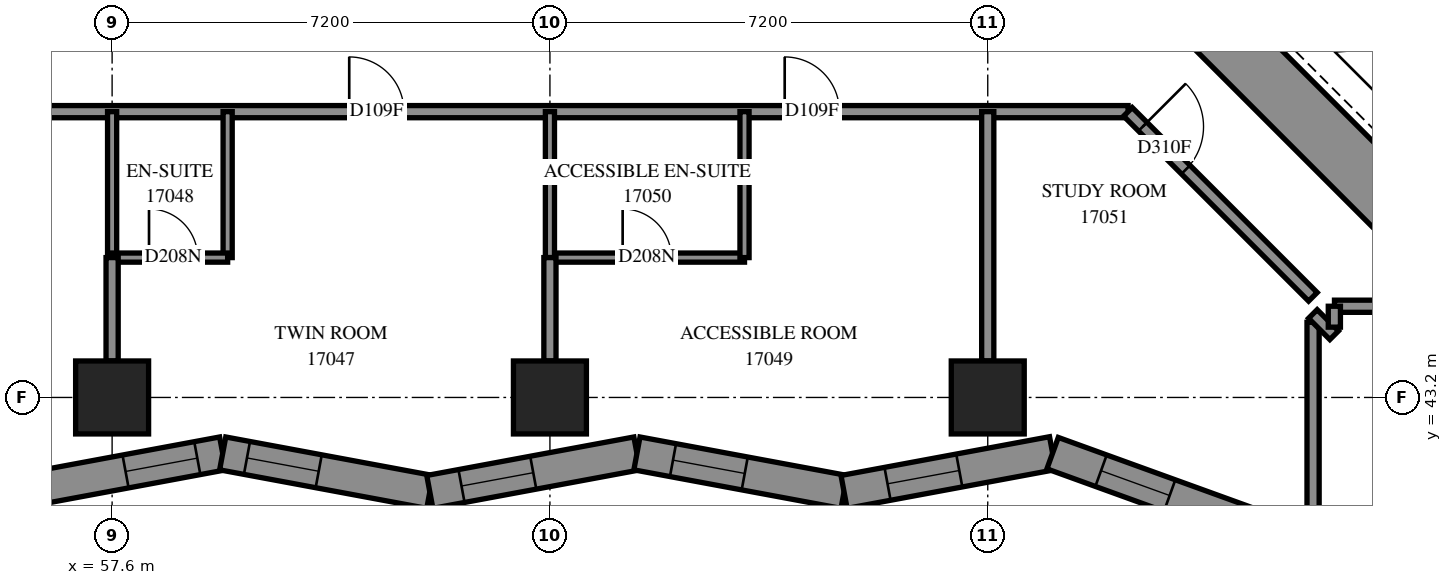
"""IFC4 building model, lengths in metres.
Left out: names, types, materials, properties, quantities, classifications, styles, units other than length and angle.
Written with IfcOpenShell. Run it as: python <this file> out.ifc"""

import sys

from ifc_helpers import new_model, si_unit, direction, frame, frame_2d, origin, origin_2d, place, context, subcontext, project, spatial, polyline, rectangle, outline, extrude, element, fill, save


model = new_model("IFC4")
c1 = context("Model", 3, precision=1e-05, world=origin(), true_north=direction((0.0, 1.0)))
c2 = subcontext(c1, "Body", "Model", "MODEL_VIEW")
j1 = project(units=[si_unit("LENGTHUNIT", "METRE"), si_unit("PLANEANGLEUNIT", "RADIAN")], contexts=[c1])
p1 = place(None, origin())
s1 = spatial("IfcSite", under=j1, at=p1, CompositionType="ELEMENT")
p2 = place(p1, origin())
s2 = spatial("IfcBuilding", under=s1, at=p2, CompositionType="ELEMENT")
p3 = place(p2, frame((0.0, 0.0, 64.4)))
s3 = spatial("IfcBuildingStorey", under=s2, at=p3, CompositionType="ELEMENT", Elevation=64.4)
for number, where, z_axis, x_axis in (
    (1, (57.6, 43.2, 0.0), (0.0, 0.0, 1.0), (1.0, 0.0, 0.0)),
    (2, (64.8, 43.2, 0.0), (0.0, 0.0, 1.0), (1.0, 0.0, 0.0)),
    (3, (72.0, 43.2, 0.0), (0.0, 0.0, 1.0), (1.0, 0.0, 0.0)),
):
    element("IfcColumn", number, at=place(p3, frame(where, z_axis=z_axis, x_axis=x_axis)), inside=s3, PredefinedType="COLUMN", context=c2, shape_type="SweptSolid", body=[
        extrude(rectangle(XDim=1.2, YDim=1.2, at=origin_2d()), origin(), (0.0, 0.0, 1.0), 3.1),
    ])
p4 = place(p3, frame((75.594, 49.443, -0.3), z_axis=(0.0, 0.0, 1.0), x_axis=(0.7071037324, -0.70710983, 0.0)))
e4 = element("IfcWall", 4, at=p4, inside=s3, PredefinedType="SHEAR", context=c2, shape_type="SweptSolid", body=[
    extrude(rectangle(XDim=16.4, YDim=1.0, at=frame_2d((8.2, 0.0))), origin(), (0.0, 0.0, 1.0), 2.7),
])
p5 = place(p3, frame((56.012, 41.647, 0.0), z_axis=(0.0, 0.0, 1.0), x_axis=(0.9831660022, 0.1827145649, 0.0)))
e5 = element("IfcWall", 5, at=p5, inside=s3, PredefinedType="SOLIDWALL", context=c2, shape_type="SweptSolid", body=[
    extrude(outline(polyline([(-0.051, -0.275), (3.413, -0.275), (3.516, 0.275), (0.051, 0.275), (-0.051, -0.275)])), origin(), (0.0, 0.0, 1.0), 3.1),
])
p6 = place(p5, frame((1.84, 0.0, 0.5)))
e6 = element("IfcOpeningElement", 6, at=p6, cuts=e5, PredefinedType="OPENING", context=c2, shape_type="SweptSolid", body=[
    extrude(rectangle(XDim=1.2, YDim=2.45, at=frame_2d((0.6, 1.225))), frame((0.0, 0.285, 0.0), z_axis=(0.0, -1.0, 0.0), x_axis=(1.0, 0.0, 0.0)), (0.0, 0.0, 1.0), 0.57),
])
p7 = place(p3, frame((59.419, 42.28, 0.0), z_axis=(0.0, 0.0, 1.0), x_axis=(0.9831669658, -0.1827093798, 0.0)))
e7 = element("IfcWall", 7, at=p7, inside=s3, PredefinedType="SOLIDWALL", context=c2, shape_type="SweptSolid", body=[
    extrude(outline(polyline([(0.051, -0.275), (3.516, -0.275), (3.413, 0.275), (-0.051, 0.275), (0.051, -0.275)])), origin(), (0.0, 0.0, 1.0), 3.1),
])
p8 = place(p7, frame((0.406, 0.0, 0.5)))
e8 = element("IfcOpeningElement", 8, at=p8, cuts=e7, PredefinedType="OPENING", context=c2, shape_type="SweptSolid", body=[
    extrude(rectangle(XDim=1.2, YDim=2.45, at=frame_2d((0.6, 1.225))), frame((0.0, 0.285, 0.0), z_axis=(0.0, -1.0, 0.0), x_axis=(1.0, 0.0, 0.0)), (0.0, 0.0, 1.0), 0.57),
])
p9 = place(p3, frame((62.825, 41.647, 0.0), z_axis=(0.0, 0.0, 1.0), x_axis=(0.9831669658, 0.1827093798, 0.0)))
e9 = element("IfcWall", 9, at=p9, inside=s3, PredefinedType="SOLIDWALL", context=c2, shape_type="SweptSolid", body=[
    extrude(outline(polyline([(-0.051, -0.275), (3.413, -0.275), (3.516, 0.275), (0.051, 0.275), (-0.051, -0.275)])), origin(), (0.0, 0.0, 1.0), 3.1),
])
p10 = place(p9, frame((0.53, 0.0, 0.5)))
e10 = element("IfcOpeningElement", 10, at=p10, cuts=e9, PredefinedType="OPENING", context=c2, shape_type="SweptSolid", body=[
    extrude(rectangle(XDim=1.2, YDim=2.45, at=frame_2d((0.6, 1.225))), frame((0.0, 0.285, 0.0), z_axis=(0.0, -1.0, 0.0), x_axis=(1.0, 0.0, 0.0)), (0.0, 0.0, 1.0), 0.57),
])
p11 = place(p3, frame((66.231, 42.28, 0.0), z_axis=(0.0, 0.0, 1.0), x_axis=(0.9831669658, -0.1827093798, 0.0)))
e11 = element("IfcWall", 11, at=p11, inside=s3, PredefinedType="SOLIDWALL", context=c2, shape_type="SweptSolid", body=[
    extrude(outline(polyline([(0.051, -0.275), (3.516, -0.275), (3.413, 0.275), (-0.051, 0.275), (0.051, -0.275)])), origin(), (0.0, 0.0, 1.0), 3.1),
])
p12 = place(p11, frame((0.603, 0.0, 0.5)))
e12 = element("IfcOpeningElement", 12, at=p12, cuts=e11, PredefinedType="OPENING", context=c2, shape_type="SweptSolid", body=[
    extrude(rectangle(XDim=1.2, YDim=2.45, at=frame_2d((0.6, 1.225))), frame((0.0, 0.285, 0.0), z_axis=(0.0, -1.0, 0.0), x_axis=(1.0, 0.0, 0.0)), (0.0, 0.0, 1.0), 0.57),
])
p13 = place(p3, frame((69.637, 41.647, 0.0), z_axis=(0.0, 0.0, 1.0), x_axis=(0.9831675545, 0.1827062117, 0.0)))
e13 = element("IfcWall", 13, at=p13, inside=s3, PredefinedType="SOLIDWALL", context=c2, shape_type="SweptSolid", body=[
    extrude(outline(polyline([(-0.051, -0.275), (3.413, -0.275), (3.563, 0.275), (0.051, 0.275), (-0.051, -0.275)])), origin(), (0.0, 0.0, 1.0), 3.1),
])
p14 = place(p13, frame((0.727, 0.0, 0.5)))
e14 = element("IfcOpeningElement", 14, at=p14, cuts=e13, PredefinedType="OPENING", context=c2, shape_type="SweptSolid", body=[
    extrude(rectangle(XDim=1.2, YDim=2.45, at=frame_2d((0.6, 1.225))), frame((0.0, 0.285, 0.0), z_axis=(0.0, -1.0, 0.0), x_axis=(1.0, 0.0, 0.0)), (0.0, 0.0, 1.0), 0.57),
])
p15 = place(p3, frame((73.067, 42.284, 0.0), z_axis=(0.0, 0.0, 1.0), x_axis=(0.940296151, -0.3403573833, 0.0)))
e15 = element("IfcWall", 15, at=p15, inside=s3, PredefinedType="SOLIDWALL", context=c2, shape_type="SweptSolid", body=[
    extrude(outline(polyline([(0.075, -0.275), (3.697, -0.275), (3.733, 0.275), (-0.075, 0.275), (0.075, -0.275)])), origin(), (0.0, 0.0, 1.0), 3.1),
])
p16 = place(p15, frame((0.847, 0.0, 0.5)))
e16 = element("IfcOpeningElement", 16, at=p16, cuts=e15, PredefinedType="OPENING", context=c2, shape_type="SweptSolid", body=[
    extrude(rectangle(XDim=1.2, YDim=2.45, at=frame_2d((0.6, 1.225))), frame((0.0, 0.285, 0.0), z_axis=(0.0, -1.0, 0.0), x_axis=(1.0, 0.0, 0.0)), (0.0, 0.0, 1.0), 0.57),
])
p17 = place(p3, frame((55.1, 47.9, 0.0), z_axis=(0.0, 0.0, 1.0), x_axis=(1.0, 0.0, 0.0)))
e17 = element("IfcWall", 17, at=p17, inside=s3, PredefinedType="PARTITIONING", context=c2, shape_type="SweptSolid", body=[
    extrude(rectangle(XDim=19.208, YDim=0.2, at=frame_2d((9.604, 0.0))), origin(), (0.0, 0.0, 1.0), 3.1),
])
p18 = place(p17, frame((6.399, 0.0, 0.0)))
e18 = element("IfcOpeningElement", 18, at=p18, cuts=e17, PredefinedType="OPENING", context=c2, shape_type="SweptSolid", body=[
    extrude(rectangle(XDim=0.9, YDim=2.1, at=frame_2d((0.45, 1.05))), frame((0.0, 0.11, 0.0), z_axis=(0.0, -1.0, 0.0), x_axis=(1.0, 0.0, 0.0)), (0.0, 0.0, 1.0), 0.22),
])
p19 = place(p17, frame((13.561, 0.0, 0.0)))
e19 = element("IfcOpeningElement", 19, at=p19, cuts=e17, PredefinedType="OPENING", context=c2, shape_type="SweptSolid", body=[
    extrude(rectangle(XDim=0.9, YDim=2.1, at=frame_2d((0.45, 1.05))), frame((0.0, 0.11, 0.0), z_axis=(0.0, -1.0, 0.0), x_axis=(1.0, 0.0, 0.0)), (0.0, 0.0, 1.0), 0.22),
])
p20 = place(p3, frame((74.305, 47.897, 0.0), z_axis=(0.0, 0.0, 1.0), x_axis=(0.7071067812, -0.7071067812, 0.0)))
e20 = element("IfcWall", 20, at=p20, inside=s3, PredefinedType="PARTITIONING", context=c2, shape_type="SweptSolid", body=[
    extrude(rectangle(XDim=4.302, YDim=0.2, at=frame_2d((2.151, 0.0))), origin(), (0.0, 0.0, 1.0), 3.1),
])
p21 = place(p20, frame((0.345, 0.0, 0.0)))
e21 = element("IfcOpeningElement", 21, at=p21, cuts=e20, PredefinedType="OPENING", context=c2, shape_type="SweptSolid", body=[
    extrude(rectangle(XDim=1.0, YDim=2.1, at=frame_2d((0.5, 1.05))), frame((0.0, 0.11, 0.0), z_axis=(0.0, -1.0, 0.0), x_axis=(1.0, 0.0, 0.0)), (0.0, 0.0, 1.0), 0.22),
])
p22 = place(p3, frame((72.0, 43.8, 0.0), z_axis=(0.0, 0.0, 1.0), x_axis=(0.0, 1.0, 0.0)))
e22 = element("IfcWall", 22, at=p22, inside=s3, PredefinedType="PARTITIONING", context=c2, shape_type="SweptSolid", body=[
    extrude(rectangle(XDim=4.1, YDim=0.2, at=frame_2d((2.05, 0.0))), origin(), (0.0, 0.0, 1.0), 3.1),
])
p23 = place(p3, frame((77.35, 40.92, 0.0), z_axis=(0.0, 0.0, 1.0), x_axis=(0.0, 1.0, 0.0)))
e23 = element("IfcWall", 23, at=p23, inside=s3, PredefinedType="PARTITIONING", context=c2, shape_type="SweptSolid", body=[
    extrude(rectangle(XDim=3.516, YDim=0.2, at=frame_2d((1.758, 0.0))), origin(), (0.0, 0.0, 1.0), 3.1),
])
p24 = place(p3, frame((64.8, 45.5, 0.0), z_axis=(0.0, 0.0, 1.0), x_axis=(1.0, 0.0, 0.0)))
e24 = element("IfcWall", 24, at=p24, inside=s3, PredefinedType="PARTITIONING", context=c2, shape_type="SweptSolid", body=[
    extrude(rectangle(XDim=3.2, YDim=0.15, at=frame_2d((1.6, 0.0))), origin(), (0.0, 0.0, 1.0), 3.1),
])
p25 = place(p24, frame((1.196, 0.0, 0.0)))
e25 = element("IfcOpeningElement", 25, at=p25, cuts=e24, PredefinedType="OPENING", context=c2, shape_type="SweptSolid", body=[
    extrude(rectangle(XDim=0.8, YDim=2.1, at=frame_2d((0.4, 1.05))), frame((0.0, 0.085, 0.0), z_axis=(0.0, -1.0, 0.0), x_axis=(1.0, 0.0, 0.0)), (0.0, 0.0, 1.0), 0.17),
])
for number, where, z_axis, x_axis in (
    (26, (59.5, 45.5, 0.0), (0.0, 0.0, 1.0), (0.0, 1.0, 0.0)),
    (27, (57.6, 45.5, 0.0), (0.0, 0.0, 1.0), (0.0, 1.0, 0.0)),
    (28, (68.0, 45.5, 0.0), (0.0, 0.0, 1.0), (0.0, 1.0, 0.0)),
    (29, (64.8, 45.5, 0.0), (0.0, 0.0, 1.0), (0.0, 1.0, 0.0)),
):
    element("IfcWall", number, at=place(p3, frame(where, z_axis=z_axis, x_axis=x_axis)), inside=s3, PredefinedType="PARTITIONING", context=c2, shape_type="SweptSolid", body=[
        extrude(rectangle(XDim=2.4, YDim=0.15, at=frame_2d((1.2, 0.0))), origin(), (0.0, 0.0, 1.0), 3.1),
    ])
p26 = place(p3, frame((57.6, 45.5, 0.0), z_axis=(0.0, 0.0, 1.0), x_axis=(1.0, 0.0, 0.0)))
e30 = element("IfcWall", 30, at=p26, inside=s3, PredefinedType="PARTITIONING", context=c2, shape_type="SweptSolid", body=[
    extrude(rectangle(XDim=1.9, YDim=0.15, at=frame_2d((0.95, 0.0))), origin(), (0.0, 0.0, 1.0), 3.1),
])
p27 = place(p26, frame((0.607, 0.0, 0.0)))
e31 = element("IfcOpeningElement", 31, at=p27, cuts=e30, PredefinedType="OPENING", context=c2, shape_type="SweptSolid", body=[
    extrude(rectangle(XDim=0.8, YDim=2.1, at=frame_2d((0.4, 1.05))), frame((0.0, 0.085, 0.0), z_axis=(0.0, -1.0, 0.0), x_axis=(1.0, 0.0, 0.0)), (0.0, 0.0, 1.0), 0.17),
])
p28 = place(p3, frame((77.702, 44.7, 0.0), z_axis=(0.0, 0.0, 1.0), x_axis=(1.0, 0.0, 0.0)))
e32 = element("IfcWall", 32, at=p28, inside=s3, PredefinedType="PARTITIONING", context=c2, shape_type="SweptSolid", body=[
    extrude(rectangle(XDim=1.814, YDim=0.2, at=frame_2d((0.907, 0.0))), origin(), (0.0, 0.0, 1.0), 3.1),
])
for number, where, z_axis, x_axis in (
    (33, (57.6, 43.8, 0.0), (0.0, 0.0, 1.0), (0.0, 1.0, 0.0)),
    (34, (64.8, 43.8, 0.0), (0.0, 0.0, 1.0), (0.0, 1.0, 0.0)),
):
    element("IfcWall", number, at=place(p3, frame(where, z_axis=z_axis, x_axis=x_axis)), inside=s3, PredefinedType="PARTITIONING", context=c2, shape_type="SweptSolid", body=[
        extrude(rectangle(XDim=1.7, YDim=0.2, at=frame_2d((0.85, 0.0))), origin(), (0.0, 0.0, 1.0), 3.1),
    ])
p29 = place(p3, frame((77.347, 44.573, 0.0), z_axis=(0.0, 0.0, 1.0), x_axis=(0.7071067812, -0.7071067812, 0.0)))
e35 = element("IfcWall", 35, at=p29, inside=s3, PredefinedType="PARTITIONING", context=c2, shape_type="SweptSolid", body=[
    extrude(rectangle(XDim=0.495, YDim=0.2, at=frame_2d((0.247, 0.0))), origin(), (0.0, 0.0, 1.0), 3.1),
])
p30 = place(p3, frame((77.7, 44.356, 0.0), z_axis=(0.0, 0.0, 1.0), x_axis=(0.0, 1.0, 0.0)))
e36 = element("IfcWall", 36, at=p30, inside=s3, PredefinedType="PARTITIONING", context=c2, shape_type="SweptSolid", body=[
    extrude(rectangle(XDim=0.344, YDim=0.2, at=frame_2d((0.172, 0.0))), origin(), (0.0, 0.0, 1.0), 3.1),
])
p31 = place(p6, origin())
e37 = element("IfcWindow", 37, at=p31, inside=s3, PartitioningType="SINGLE_PANEL", PredefinedType="WINDOW", context=c2, shape_type="SweptSolid", body=[
    extrude(rectangle(XDim=1.2, YDim=2.45, at=frame_2d((0.6, 1.225))), frame((0.0, 0.155, 0.0), z_axis=(0.0, -1.0, 0.0), x_axis=(1.0, 0.0, 0.0)), (0.0, 0.0, 1.0), 0.06),
])
fill(e6, e37)
p32 = place(p8, origin())
e38 = element("IfcWindow", 38, at=p32, inside=s3, PartitioningType="SINGLE_PANEL", PredefinedType="WINDOW", context=c2, shape_type="SweptSolid", body=[
    extrude(rectangle(XDim=1.2, YDim=2.45, at=frame_2d((0.6, 1.225))), frame((0.0, 0.155, 0.0), z_axis=(0.0, -1.0, 0.0), x_axis=(1.0, 0.0, 0.0)), (0.0, 0.0, 1.0), 0.06),
])
fill(e8, e38)
p33 = place(p10, origin())
e39 = element("IfcWindow", 39, at=p33, inside=s3, PartitioningType="SINGLE_PANEL", PredefinedType="WINDOW", context=c2, shape_type="SweptSolid", body=[
    extrude(rectangle(XDim=1.2, YDim=2.45, at=frame_2d((0.6, 1.225))), frame((0.0, 0.155, 0.0), z_axis=(0.0, -1.0, 0.0), x_axis=(1.0, 0.0, 0.0)), (0.0, 0.0, 1.0), 0.06),
])
fill(e10, e39)
p34 = place(p12, origin())
e40 = element("IfcWindow", 40, at=p34, inside=s3, PartitioningType="SINGLE_PANEL", PredefinedType="WINDOW", context=c2, shape_type="SweptSolid", body=[
    extrude(rectangle(XDim=1.2, YDim=2.45, at=frame_2d((0.6, 1.225))), frame((0.0, 0.155, 0.0), z_axis=(0.0, -1.0, 0.0), x_axis=(1.0, 0.0, 0.0)), (0.0, 0.0, 1.0), 0.06),
])
fill(e12, e40)
p35 = place(p14, origin())
e41 = element("IfcWindow", 41, at=p35, inside=s3, PartitioningType="SINGLE_PANEL", PredefinedType="WINDOW", context=c2, shape_type="SweptSolid", body=[
    extrude(rectangle(XDim=1.2, YDim=2.45, at=frame_2d((0.6, 1.225))), frame((0.0, 0.155, 0.0), z_axis=(0.0, -1.0, 0.0), x_axis=(1.0, 0.0, 0.0)), (0.0, 0.0, 1.0), 0.06),
])
fill(e14, e41)
p36 = place(p16, origin())
e42 = element("IfcWindow", 42, at=p36, inside=s3, PartitioningType="SINGLE_PANEL", PredefinedType="WINDOW", context=c2, shape_type="SweptSolid", body=[
    extrude(rectangle(XDim=1.2, YDim=2.45, at=frame_2d((0.6, 1.225))), frame((0.0, 0.155, 0.0), z_axis=(0.0, -1.0, 0.0), x_axis=(1.0, 0.0, 0.0)), (0.0, 0.0, 1.0), 0.06),
])
fill(e16, e42)
p37 = place(p18, origin())
e43 = element("IfcDoor", 43, at=p37, inside=s3, OperationType="SINGLE_SWING_LEFT", PredefinedType="DOOR", context=c2, shape_type="SweptSolid", body=[
    extrude(rectangle(XDim=0.9, YDim=2.1, at=frame_2d((0.45, 1.05))), frame((0.0, 0.025, 0.0), z_axis=(0.0, -1.0, 0.0), x_axis=(1.0, 0.0, 0.0)), (0.0, 0.0, 1.0), 0.05),
])
fill(e18, e43)
p38 = place(p27, origin())
e44 = element("IfcDoor", 44, at=p38, inside=s3, OperationType="SINGLE_SWING_RIGHT", PredefinedType="DOOR", context=c2, shape_type="SweptSolid", body=[
    extrude(rectangle(XDim=0.8, YDim=2.1, at=frame_2d((0.4, 1.05))), frame((0.0, 0.025, 0.0), z_axis=(0.0, -1.0, 0.0), x_axis=(1.0, 0.0, 0.0)), (0.0, 0.0, 1.0), 0.05),
])
fill(e31, e44)
p39 = place(p19, origin())
e45 = element("IfcDoor", 45, at=p39, inside=s3, OperationType="SINGLE_SWING_LEFT", PredefinedType="DOOR", context=c2, shape_type="SweptSolid", body=[
    extrude(rectangle(XDim=0.9, YDim=2.1, at=frame_2d((0.45, 1.05))), frame((0.0, 0.025, 0.0), z_axis=(0.0, -1.0, 0.0), x_axis=(1.0, 0.0, 0.0)), (0.0, 0.0, 1.0), 0.05),
])
fill(e19, e45)
p40 = place(p25, origin())
e46 = element("IfcDoor", 46, at=p40, inside=s3, OperationType="SINGLE_SWING_RIGHT", PredefinedType="DOOR", context=c2, shape_type="SweptSolid", body=[
    extrude(rectangle(XDim=0.8, YDim=2.1, at=frame_2d((0.4, 1.05))), frame((0.0, 0.025, 0.0), z_axis=(0.0, -1.0, 0.0), x_axis=(1.0, 0.0, 0.0)), (0.0, 0.0, 1.0), 0.05),
])
fill(e25, e46)
p41 = place(p21, origin())
e47 = element("IfcDoor", 47, at=p41, inside=s3, OperationType="SINGLE_SWING_LEFT", PredefinedType="DOOR", context=c2, shape_type="SweptSolid", body=[
    extrude(rectangle(XDim=1.0, YDim=2.1, at=frame_2d((0.5, 1.05))), frame((0.0, 0.025, 0.0), z_axis=(0.0, -1.0, 0.0), x_axis=(1.0, 0.0, 0.0)), (0.0, 0.0, 1.0), 0.05),
])
fill(e21, e47)
save(model, sys.argv[1])
